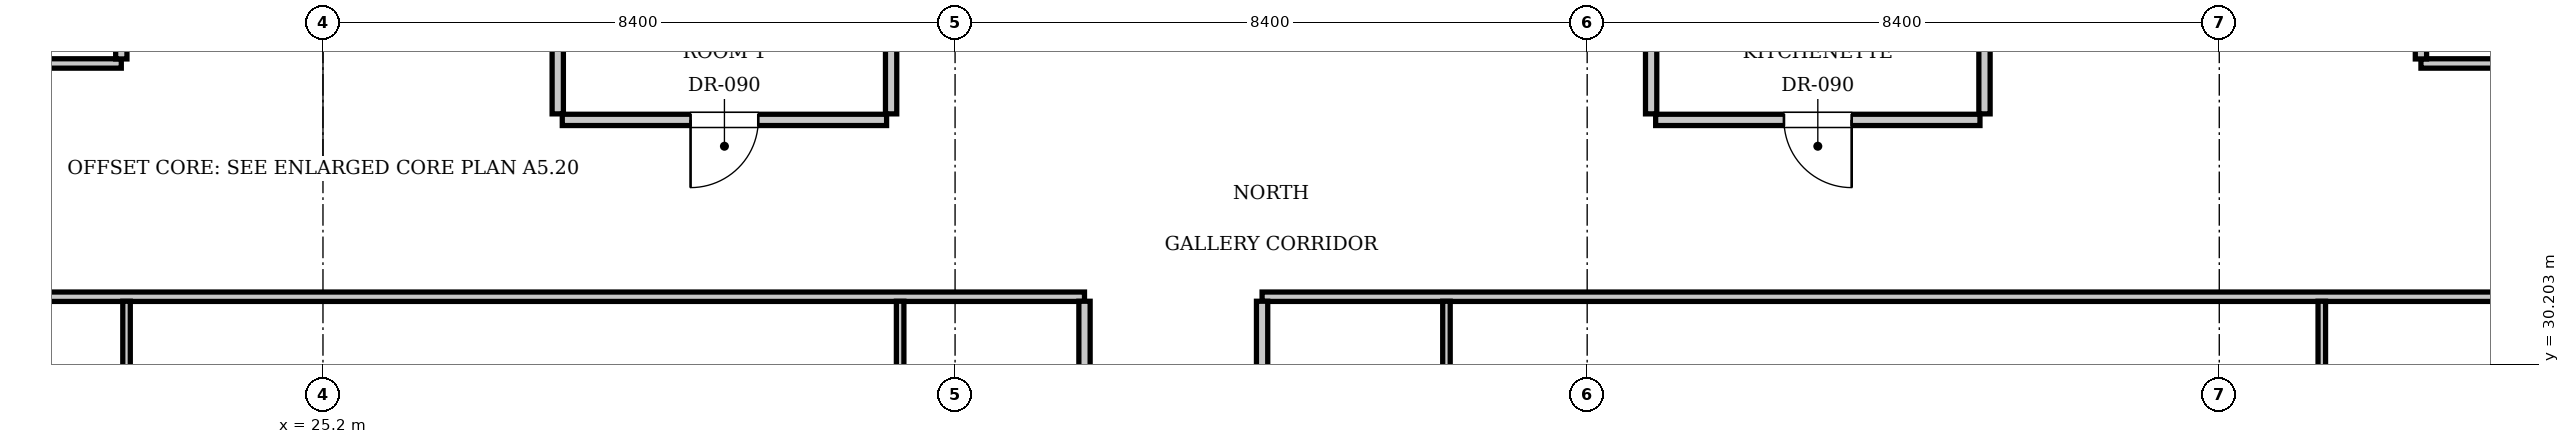
"""IFC4 building model, lengths in metres.
Left out: names, types, materials, properties, quantities, classifications, styles, units other than length and angle.
Written with IfcOpenShell. Run it as: python <this file> out.ifc"""

import sys

from ifc_helpers import new_model, si_unit, direction, frame, frame_2d, origin, place, context, subcontext, project, spatial, rectangle, extrude, element, fill, save


model = new_model("IFC4")
c1 = context("Model", 3, precision=1e-05, world=origin(), true_north=direction((0.0, 1.0)))
c2 = subcontext(c1, "Body", "Model", "MODEL_VIEW")
j1 = project(units=[si_unit("LENGTHUNIT", "METRE"), si_unit("PLANEANGLEUNIT", "RADIAN")], contexts=[c1])
p1 = place(None, origin())
s1 = spatial("IfcSite", under=j1, at=p1, CompositionType="ELEMENT")
p2 = place(p1, origin())
s2 = spatial("IfcBuilding", under=s1, at=p2, CompositionType="ELEMENT")
p3 = place(p2, frame((0.0, 0.0, 138.95)))
s3 = spatial("IfcBuildingStorey", under=s2, at=p3, CompositionType="ELEMENT", Elevation=138.95)
for number, where, z_axis, x_axis in (
    (1, (28.32, 33.53, 0.0), (0.0, 0.0, 1.0), (0.0, 1.0, 0.0)),
    (2, (32.75, 33.53, 0.0), (0.0, 0.0, 1.0), (0.0, 1.0, 0.0)),
):
    element("IfcWall", number, at=place(p3, frame(where, z_axis=z_axis, x_axis=x_axis)), inside=s3, PredefinedType="PARTITIONING", context=c2, shape_type="SweptSolid", body=[
        extrude(rectangle(XDim=2.59, YDim=0.15, at=frame_2d((1.295, 0.0))), origin(), (0.0, 0.0, 1.0), 3.61),
    ])
p4 = place(p3, frame((28.38, 33.45, 0.0), z_axis=(0.0, 0.0, 1.0), x_axis=(1.0, 0.0, 0.0)))
e3 = element("IfcWall", 3, at=p4, inside=s3, PredefinedType="PARTITIONING", context=c2, shape_type="SweptSolid", body=[
    extrude(rectangle(XDim=4.31, YDim=0.15, at=frame_2d((2.155, 0.0))), origin(), (0.0, 0.0, 1.0), 3.61),
])
p5 = place(p4, frame((1.705, 0.0, 0.0)))
e4 = element("IfcOpeningElement", 4, at=p5, cuts=e3, PredefinedType="OPENING", context=c2, shape_type="SweptSolid", body=[
    extrude(rectangle(XDim=0.9, YDim=2.1, at=frame_2d((0.45, 1.05))), frame((0.0, 0.085, 0.0), z_axis=(0.0, -1.0, 0.0), x_axis=(1.0, 0.0, 0.0)), (0.0, 0.0, 1.0), 0.17),
])
for number, where, z_axis, x_axis in (
    (5, (42.85, 33.53, 0.0), (0.0, 0.0, 1.0), (0.0, 1.0, 0.0)),
    (6, (47.28, 33.53, 0.0), (0.0, 0.0, 1.0), (0.0, 1.0, 0.0)),
):
    element("IfcWall", number, at=place(p3, frame(where, z_axis=z_axis, x_axis=x_axis)), inside=s3, PredefinedType="PARTITIONING", context=c2, shape_type="SweptSolid", body=[
        extrude(rectangle(XDim=2.59, YDim=0.15, at=frame_2d((1.295, 0.0))), origin(), (0.0, 0.0, 1.0), 3.61),
    ])
p6 = place(p3, frame((42.91, 33.45, 0.0), z_axis=(0.0, 0.0, 1.0), x_axis=(1.0, 0.0, 0.0)))
e7 = element("IfcWall", 7, at=p6, inside=s3, PredefinedType="PARTITIONING", context=c2, shape_type="SweptSolid", body=[
    extrude(rectangle(XDim=4.31, YDim=0.15, at=frame_2d((2.155, 0.0))), origin(), (0.0, 0.0, 1.0), 3.61),
])
p7 = place(p6, frame((1.705, 0.0, 0.0)))
e8 = element("IfcOpeningElement", 8, at=p7, cuts=e7, PredefinedType="OPENING", context=c2, shape_type="SweptSolid", body=[
    extrude(rectangle(XDim=0.9, YDim=2.1, at=frame_2d((0.45, 1.05))), frame((0.0, 0.085, 0.0), z_axis=(0.0, -1.0, 0.0), x_axis=(1.0, 0.0, 0.0)), (0.0, 0.0, 1.0), 0.17),
])
p8 = place(p3, frame((13.2, 31.1, 0.0), z_axis=(0.0, 0.0, 1.0), x_axis=(1.0, 0.0, 0.0)))
e9 = element("IfcWall", 9, at=p8, inside=s3, PredefinedType="PARTITIONING", context=c2, shape_type="SweptSolid", body=[
    extrude(rectangle(XDim=22.12, YDim=0.125, at=frame_2d((11.06, 0.0))), origin(), (0.0, 0.0, 1.0), 3.61),
])
p9 = place(p3, frame((37.68, 31.1, 0.0), z_axis=(0.0, 0.0, 1.0), x_axis=(1.0, 0.0, 0.0)))
e10 = element("IfcWall", 10, at=p9, inside=s3, PredefinedType="PARTITIONING", context=c2, shape_type="SweptSolid", body=[
    extrude(rectangle(XDim=24.72, YDim=0.125, at=frame_2d((12.36, 0.0))), origin(), (0.0, 0.0, 1.0), 3.61),
])
p10 = place(p3, frame((35.32, 29.15, 0.0), z_axis=(0.0, 0.0, 1.0), x_axis=(0.0, 1.0, 0.0)))
e11 = element("IfcWall", 11, at=p10, inside=s3, PredefinedType="PARTITIONING", context=c2, shape_type="SweptSolid", body=[
    extrude(rectangle(XDim=1.89, YDim=0.15, at=frame_2d((0.945, 0.0))), origin(), (0.0, 0.0, 1.0), 3.61),
])
p11 = place(p3, frame((32.87, 29.15, 0.0), z_axis=(0.0, 0.0, 1.0), x_axis=(0.0, 1.0, 0.0)))
e12 = element("IfcWall", 12, at=p11, inside=s3, PredefinedType="PARTITIONING", context=c2, shape_type="SweptSolid", body=[
    extrude(rectangle(XDim=1.89, YDim=0.1, at=frame_2d((0.945, 0.0))), origin(), (0.0, 0.0, 1.0), 3.61),
])
p12 = place(p3, frame((22.59, 26.43, 0.0), z_axis=(0.0, 0.0, 1.0), x_axis=(0.0, 1.0, 0.0)))
e13 = element("IfcWall", 13, at=p12, inside=s3, PredefinedType="PARTITIONING", context=c2, shape_type="SweptSolid", body=[
    extrude(rectangle(XDim=4.61, YDim=0.1, at=frame_2d((2.305, 0.0))), origin(), (0.0, 0.0, 1.0), 3.61),
])
p13 = place(p12, frame((1.855, 0.0, 0.0)))
e14 = element("IfcOpeningElement", 14, at=p13, cuts=e13, PredefinedType="OPENING", context=c2, shape_type="SweptSolid", body=[
    extrude(rectangle(XDim=0.9, YDim=2.1, at=frame_2d((0.45, 1.05))), frame((0.0, 0.06, 0.0), z_axis=(0.0, -1.0, 0.0), x_axis=(1.0, 0.0, 0.0)), (0.0, 0.0, 1.0), 0.12),
])
p14 = place(p3, frame((37.68, 29.15, 0.0), z_axis=(0.0, 0.0, 1.0), x_axis=(0.0, 1.0, 0.0)))
e15 = element("IfcWall", 15, at=p14, inside=s3, PredefinedType="PARTITIONING", context=c2, shape_type="SweptSolid", body=[
    extrude(rectangle(XDim=1.89, YDim=0.15, at=frame_2d((0.945, 0.0))), origin(), (0.0, 0.0, 1.0), 3.61),
])
p15 = place(p3, frame((40.13, 29.15, 0.0), z_axis=(0.0, 0.0, 1.0), x_axis=(0.0, 1.0, 0.0)))
e16 = element("IfcWall", 16, at=p15, inside=s3, PredefinedType="PARTITIONING", context=c2, shape_type="SweptSolid", body=[
    extrude(rectangle(XDim=1.89, YDim=0.1, at=frame_2d((0.945, 0.0))), origin(), (0.0, 0.0, 1.0), 3.61),
])
p16 = place(p3, frame((51.762, 26.43, 0.0), z_axis=(0.0, 0.0, 1.0), x_axis=(0.0, 1.0, 0.0)))
e17 = element("IfcWall", 17, at=p16, inside=s3, PredefinedType="PARTITIONING", context=c2, shape_type="SweptSolid", body=[
    extrude(rectangle(XDim=4.61, YDim=0.1, at=frame_2d((2.305, 0.0))), origin(), (0.0, 0.0, 1.0), 3.61),
])
p17 = place(p16, frame((1.855, 0.0, 0.0)))
e18 = element("IfcOpeningElement", 18, at=p17, cuts=e17, PredefinedType="OPENING", context=c2, shape_type="SweptSolid", body=[
    extrude(rectangle(XDim=0.9, YDim=2.1, at=frame_2d((0.45, 1.05))), frame((0.0, 0.06, 0.0), z_axis=(0.0, -1.0, 0.0), x_axis=(1.0, 0.0, 0.0)), (0.0, 0.0, 1.0), 0.12),
])
p18 = place(p3, frame((13.2, 34.2, 0.0), z_axis=(0.0, 0.0, 1.0), x_axis=(1.0, 0.0, 0.0)))
e19 = element("IfcWall", 19, at=p18, inside=s3, PredefinedType="PARTITIONING", context=c2, shape_type="SweptSolid", body=[
    extrude(rectangle(XDim=9.32, YDim=0.125, at=frame_2d((4.66, 0.0))), origin(), (0.0, 0.0, 1.0), 3.61),
])
p19 = place(p3, frame((53.08, 34.2, 0.0), z_axis=(0.0, 0.0, 1.0), x_axis=(1.0, 0.0, 0.0)))
e20 = element("IfcWall", 20, at=p19, inside=s3, PredefinedType="PARTITIONING", context=c2, shape_type="SweptSolid", body=[
    extrude(rectangle(XDim=9.32, YDim=0.125, at=frame_2d((4.66, 0.0))), origin(), (0.0, 0.0, 1.0), 3.61),
])
for number, where, z_axis, x_axis in (
    (21, (22.52, 34.26, 0.0), (0.0, 0.0, 1.0), (0.0, 1.0, 0.0)),
    (22, (53.08, 34.26, 0.0), (0.0, 0.0, 1.0), (0.0, 1.0, 0.0)),
):
    element("IfcWall", number, at=place(p3, frame(where, z_axis=z_axis, x_axis=x_axis)), inside=s3, PredefinedType="PARTITIONING", context=c2, shape_type="SweptSolid", body=[
        extrude(rectangle(XDim=2.29, YDim=0.15, at=frame_2d((1.145, 0.0))), origin(), (0.0, 0.0, 1.0), 3.61),
    ])
p20 = place(p5, frame((0.9, 0.0, 0.0), z_axis=(0.0, 0.0, 1.0), x_axis=(-1.0, 0.0, 0.0)))
e23 = element("IfcDoor", 23, at=p20, inside=s3, OperationType="SINGLE_SWING_RIGHT", PredefinedType="DOOR", context=c2, shape_type="SweptSolid", body=[
    extrude(rectangle(XDim=0.9, YDim=2.1, at=frame_2d((0.45, 1.05))), frame((0.0, 0.025, 0.0), z_axis=(0.0, -1.0, 0.0), x_axis=(1.0, 0.0, 0.0)), (0.0, 0.0, 1.0), 0.05),
])
fill(e4, e23)
p21 = place(p7, frame((0.9, 0.0, 0.0), z_axis=(0.0, 0.0, 1.0), x_axis=(-1.0, 0.0, 0.0)))
e24 = element("IfcDoor", 24, at=p21, inside=s3, OperationType="SINGLE_SWING_LEFT", PredefinedType="DOOR", context=c2, shape_type="SweptSolid", body=[
    extrude(rectangle(XDim=0.9, YDim=2.1, at=frame_2d((0.45, 1.05))), frame((0.0, 0.025, 0.0), z_axis=(0.0, -1.0, 0.0), x_axis=(1.0, 0.0, 0.0)), (0.0, 0.0, 1.0), 0.05),
])
fill(e8, e24)
save(model, sys.argv[1])
